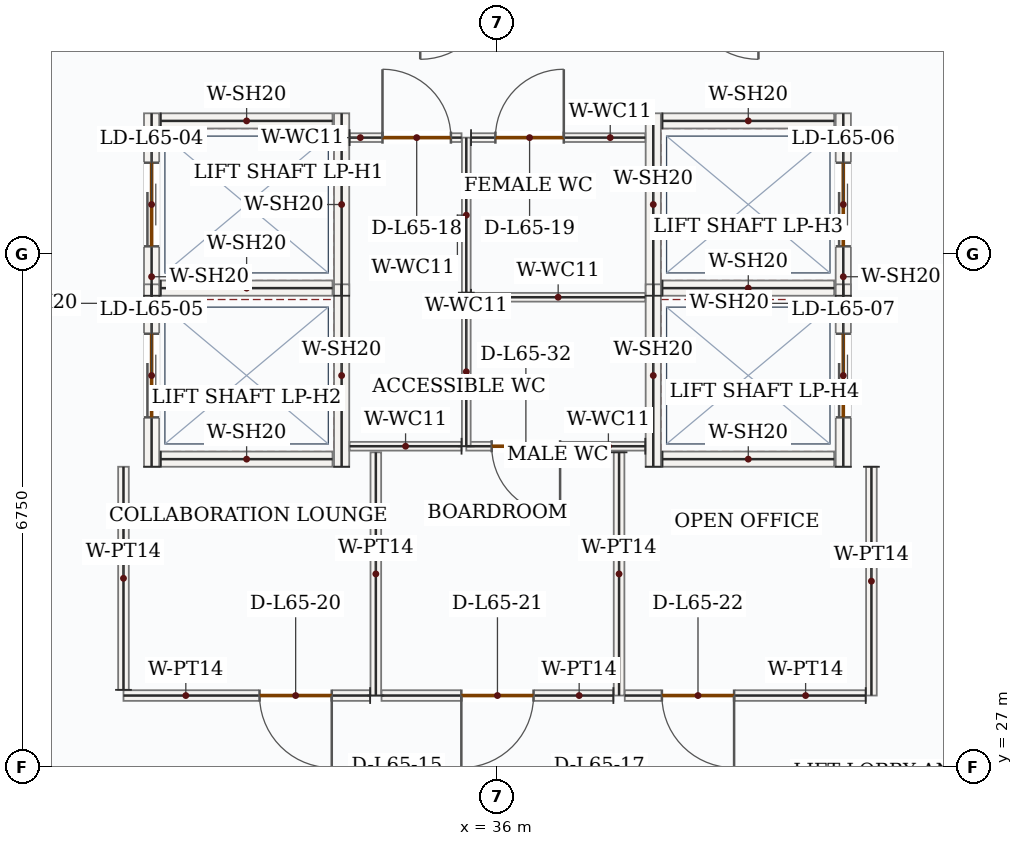
"""IFC4 building model, lengths in metres.
Left out: names, types, materials, properties, quantities, classifications, styles, units other than length and angle.
Written with IfcOpenShell. Run it as: python <this file> out.ifc"""

import sys

from ifc_helpers import new_model, si_unit, direction, frame, frame_2d, origin, place, context, subcontext, project, spatial, rectangle, extrude, source, transform, mapped, element, fill, save


model = new_model("IFC4")
c1 = context("Model", 3, precision=1e-05, world=origin(), true_north=direction((0.0, 1.0)))
c2 = subcontext(c1, "Body", "Model", "MODEL_VIEW")
j1 = project(units=[si_unit("LENGTHUNIT", "METRE"), si_unit("PLANEANGLEUNIT", "RADIAN")], contexts=[c1])
p1 = place(None, origin())
s1 = spatial("IfcSite", under=j1, at=p1, CompositionType="ELEMENT")
p2 = place(p1, origin())
s2 = spatial("IfcBuilding", under=s1, at=p2, CompositionType="ELEMENT")
p3 = place(p2, frame((0.0, 0.0, 272.85)))
s3 = spatial("IfcBuildingStorey", under=s2, at=p3, CompositionType="ELEMENT", Elevation=272.85)
p4 = place(p3, frame((31.45, 33.2, 0.0), z_axis=(0.0, 0.0, 1.0), x_axis=(0.0, 1.0, 0.0)))
e1 = element("IfcWall", 1, at=p4, inside=s3, PredefinedType="SOLIDWALL", context=c2, shape_type="SweptSolid", body=[
    extrude(rectangle(XDim=2.4, YDim=0.2, at=frame_2d((1.2, 0.0))), origin(), (0.0, 0.0, 1.0), 3.5),
])
p5 = place(p4, frame((0.65, 0.0, 0.0)))
e2 = element("IfcOpeningElement", 2, at=p5, cuts=e1, PredefinedType="OPENING", context=c2, shape_type="SweptSolid", body=[
    extrude(rectangle(XDim=1.1, YDim=2.15, at=frame_2d((0.55, 1.075))), frame((0.0, 0.11, 0.0), z_axis=(0.0, -1.0, 0.0), x_axis=(1.0, 0.0, 0.0)), (0.0, 0.0, 1.0), 0.22),
])
m1 = source(origin(), c2, "Body", "SweptSolid", [
    extrude(rectangle(XDim=2.4, YDim=0.2, at=frame_2d((1.2, 0.0))), origin(), (0.0, 0.0, 1.0), 3.5),
])
p6 = place(p3, frame((33.95, 33.2, 0.0), z_axis=(0.0, 0.0, 1.0), x_axis=(0.0, 1.0, 0.0)))
e3 = element("IfcWall", 3, at=p6, inside=s3, PredefinedType="SOLIDWALL", context=c2, shape_type="MappedRepresentation", body=[
    mapped(m1, transform((0.0, 0.0, 0.0), x_axis=(1.0, 0.0, 0.0), y_axis=(0.0, 1.0, 0.0), z_axis=(0.0, 0.0, 1.0), scale=1.0)),
])
m2 = source(origin(), c2, "Body", "SweptSolid", [
    extrude(rectangle(XDim=2.26, YDim=0.2, at=frame_2d((1.13, 0.0))), origin(), (0.0, 0.0, 1.0), 3.5),
])
for number, where, z_axis, x_axis in (
    (4, (31.57, 33.3, 0.0), (0.0, 0.0, 1.0), (1.0, 0.0, 0.0)),
    (5, (31.57, 35.5, 0.0), (0.0, 0.0, 1.0), (1.0, 0.0, 0.0)),
):
    element("IfcWall", number, at=place(p3, frame(where, z_axis=z_axis, x_axis=x_axis)), inside=s3, PredefinedType="SOLIDWALL", context=c2, shape_type="MappedRepresentation", body=[
        mapped(m2, transform((0.0, 0.0, 0.0), x_axis=(1.0, 0.0, 0.0), y_axis=(0.0, 1.0, 0.0), z_axis=(0.0, 0.0, 1.0), scale=1.0)),
    ])
p7 = place(p3, frame((31.45, 30.95, 0.0), z_axis=(0.0, 0.0, 1.0), x_axis=(0.0, 1.0, 0.0)))
e6 = element("IfcWall", 6, at=p7, inside=s3, PredefinedType="SOLIDWALL", context=c2, shape_type="SweptSolid", body=[
    extrude(rectangle(XDim=2.4, YDim=0.2, at=frame_2d((1.2, 0.0))), origin(), (0.0, 0.0, 1.0), 3.5),
])
p8 = place(p7, frame((0.65, 0.0, 0.0)))
e7 = element("IfcOpeningElement", 7, at=p8, cuts=e6, PredefinedType="OPENING", context=c2, shape_type="SweptSolid", body=[
    extrude(rectangle(XDim=1.1, YDim=2.15, at=frame_2d((0.55, 1.075))), frame((0.0, 0.11, 0.0), z_axis=(0.0, -1.0, 0.0), x_axis=(1.0, 0.0, 0.0)), (0.0, 0.0, 1.0), 0.22),
])
p9 = place(p3, frame((33.95, 30.95, 0.0), z_axis=(0.0, 0.0, 1.0), x_axis=(0.0, 1.0, 0.0)))
e8 = element("IfcWall", 8, at=p9, inside=s3, PredefinedType="SOLIDWALL", context=c2, shape_type="MappedRepresentation", body=[
    mapped(m1, transform((0.0, 0.0, 0.0), x_axis=(1.0, 0.0, 0.0), y_axis=(0.0, 1.0, 0.0), z_axis=(0.0, 0.0, 1.0), scale=1.0)),
])
p10 = place(p3, frame((31.57, 31.05, 0.0), z_axis=(0.0, 0.0, 1.0), x_axis=(1.0, 0.0, 0.0)))
e9 = element("IfcWall", 9, at=p10, inside=s3, PredefinedType="SOLIDWALL", context=c2, shape_type="MappedRepresentation", body=[
    mapped(m2, transform((0.0, 0.0, 0.0), x_axis=(1.0, 0.0, 0.0), y_axis=(0.0, 1.0, 0.0), z_axis=(0.0, 0.0, 1.0), scale=1.0)),
])
p11 = place(p3, frame((38.05, 33.2, 0.0), z_axis=(0.0, 0.0, 1.0), x_axis=(0.0, 1.0, 0.0)))
e10 = element("IfcWall", 10, at=p11, inside=s3, PredefinedType="SOLIDWALL", context=c2, shape_type="MappedRepresentation", body=[
    mapped(m1, transform((0.0, 0.0, 0.0), x_axis=(1.0, 0.0, 0.0), y_axis=(0.0, 1.0, 0.0), z_axis=(0.0, 0.0, 1.0), scale=1.0)),
])
p12 = place(p3, frame((40.55, 33.2, 0.0), z_axis=(0.0, 0.0, 1.0), x_axis=(0.0, 1.0, 0.0)))
e11 = element("IfcWall", 11, at=p12, inside=s3, PredefinedType="SOLIDWALL", context=c2, shape_type="SweptSolid", body=[
    extrude(rectangle(XDim=2.4, YDim=0.2, at=frame_2d((1.2, 0.0))), origin(), (0.0, 0.0, 1.0), 3.5),
])
p13 = place(p12, frame((0.65, 0.0, 0.0)))
e12 = element("IfcOpeningElement", 12, at=p13, cuts=e11, PredefinedType="OPENING", context=c2, shape_type="SweptSolid", body=[
    extrude(rectangle(XDim=1.1, YDim=2.15, at=frame_2d((0.55, 1.075))), frame((0.0, 0.11, 0.0), z_axis=(0.0, -1.0, 0.0), x_axis=(1.0, 0.0, 0.0)), (0.0, 0.0, 1.0), 0.22),
])
for number, where, z_axis, x_axis in (
    (13, (38.17, 33.3, 0.0), (0.0, 0.0, 1.0), (1.0, 0.0, 0.0)),
    (14, (38.17, 35.5, 0.0), (0.0, 0.0, 1.0), (1.0, 0.0, 0.0)),
):
    element("IfcWall", number, at=place(p3, frame(where, z_axis=z_axis, x_axis=x_axis)), inside=s3, PredefinedType="SOLIDWALL", context=c2, shape_type="MappedRepresentation", body=[
        mapped(m2, transform((0.0, 0.0, 0.0), x_axis=(1.0, 0.0, 0.0), y_axis=(0.0, 1.0, 0.0), z_axis=(0.0, 0.0, 1.0), scale=1.0)),
    ])
p14 = place(p3, frame((38.05, 30.95, 0.0), z_axis=(0.0, 0.0, 1.0), x_axis=(0.0, 1.0, 0.0)))
e15 = element("IfcWall", 15, at=p14, inside=s3, PredefinedType="SOLIDWALL", context=c2, shape_type="MappedRepresentation", body=[
    mapped(m1, transform((0.0, 0.0, 0.0), x_axis=(1.0, 0.0, 0.0), y_axis=(0.0, 1.0, 0.0), z_axis=(0.0, 0.0, 1.0), scale=1.0)),
])
p15 = place(p3, frame((40.55, 30.95, 0.0), z_axis=(0.0, 0.0, 1.0), x_axis=(0.0, 1.0, 0.0)))
e16 = element("IfcWall", 16, at=p15, inside=s3, PredefinedType="SOLIDWALL", context=c2, shape_type="SweptSolid", body=[
    extrude(rectangle(XDim=2.4, YDim=0.2, at=frame_2d((1.2, 0.0))), origin(), (0.0, 0.0, 1.0), 3.5),
])
p16 = place(p15, frame((0.65, 0.0, 0.0)))
e17 = element("IfcOpeningElement", 17, at=p16, cuts=e16, PredefinedType="OPENING", context=c2, shape_type="SweptSolid", body=[
    extrude(rectangle(XDim=1.1, YDim=2.15, at=frame_2d((0.55, 1.075))), frame((0.0, 0.11, 0.0), z_axis=(0.0, -1.0, 0.0), x_axis=(1.0, 0.0, 0.0)), (0.0, 0.0, 1.0), 0.22),
])
p17 = place(p3, frame((38.17, 31.05, 0.0), z_axis=(0.0, 0.0, 1.0), x_axis=(1.0, 0.0, 0.0)))
e18 = element("IfcWall", 18, at=p17, inside=s3, PredefinedType="SOLIDWALL", context=c2, shape_type="MappedRepresentation", body=[
    mapped(m2, transform((0.0, 0.0, 0.0), x_axis=(1.0, 0.0, 0.0), y_axis=(0.0, 1.0, 0.0), z_axis=(0.0, 0.0, 1.0), scale=1.0)),
])
p18 = place(p3, frame((37.945, 31.22, 0.0), z_axis=(0.0, 0.0, 1.0), x_axis=(-1.0, 0.0, 0.0)))
e19 = element("IfcWall", 19, at=p18, inside=s3, PredefinedType="PARTITIONING", context=c2, shape_type="SweptSolid", body=[
    extrude(rectangle(XDim=2.355, YDim=0.115, at=frame_2d((1.177, 0.0))), origin(), (0.0, 0.0, 1.0), 3.5),
])
p19 = place(p18, frame((1.121, 0.0, 0.0)))
e20 = element("IfcOpeningElement", 20, at=p19, cuts=e19, PredefinedType="OPENING", context=c2, shape_type="SweptSolid", body=[
    extrude(rectangle(XDim=0.9, YDim=2.1, at=frame_2d((0.45, 1.05))), frame((0.0, 0.067, 0.0), z_axis=(0.0, -1.0, 0.0), x_axis=(1.0, 0.0, 0.0)), (0.0, 0.0, 1.0), 0.135),
])
m3 = source(origin(), c2, "Body", "SweptSolid", [
    extrude(rectangle(XDim=1.96, YDim=0.115, at=frame_2d((0.98, 0.0))), origin(), (0.0, 0.0, 1.0), 3.5),
])
p20 = place(p3, frame((35.59, 31.22, 0.0), z_axis=(0.0, 0.0, 1.0), x_axis=(0.0, 1.0, 0.0)))
e21 = element("IfcWall", 21, at=p20, inside=s3, PredefinedType="PARTITIONING", context=c2, shape_type="MappedRepresentation", body=[
    mapped(m3, transform((0.0, 0.0, 0.0), x_axis=(1.0, 0.0, 0.0), y_axis=(0.0, 1.0, 0.0), z_axis=(0.0, 0.0, 1.0), scale=1.0)),
])
m4 = source(origin(), c2, "Body", "SweptSolid", [
    extrude(rectangle(XDim=2.292, YDim=0.115, at=frame_2d((1.146, 0.0))), origin(), (0.0, 0.0, 1.0), 3.5),
])
p21 = place(p3, frame((35.653, 33.18, 0.0), z_axis=(0.0, 0.0, 1.0), x_axis=(1.0, 0.0, 0.0)))
e22 = element("IfcWall", 22, at=p21, inside=s3, PredefinedType="PARTITIONING", context=c2, shape_type="MappedRepresentation", body=[
    mapped(m4, transform((0.0, 0.0, 0.0), x_axis=(1.0, 0.0, 0.0), y_axis=(0.0, 1.0, 0.0), z_axis=(0.0, 0.0, 1.0), scale=1.0)),
])
m5 = source(origin(), c2, "Body", "SweptSolid", [
    extrude(rectangle(XDim=2.04, YDim=0.115, at=frame_2d((1.02, 0.0))), origin(), (0.0, 0.0, 1.0), 3.5),
])
p22 = place(p3, frame((35.59, 33.24, 0.0), z_axis=(0.0, 0.0, 1.0), x_axis=(0.0, 1.0, 0.0)))
e23 = element("IfcWall", 23, at=p22, inside=s3, PredefinedType="PARTITIONING", context=c2, shape_type="MappedRepresentation", body=[
    mapped(m5, transform((0.0, 0.0, 0.0), x_axis=(1.0, 0.0, 0.0), y_axis=(0.0, 1.0, 0.0), z_axis=(0.0, 0.0, 1.0), scale=1.0)),
])
p23 = place(p3, frame((35.653, 35.28, 0.0), z_axis=(0.0, 0.0, 1.0), x_axis=(1.0, 0.0, 0.0)))
e24 = element("IfcWall", 24, at=p23, inside=s3, PredefinedType="PARTITIONING", context=c2, shape_type="SweptSolid", body=[
    extrude(rectangle(XDim=2.292, YDim=0.115, at=frame_2d((1.146, 0.0))), origin(), (0.0, 0.0, 1.0), 3.5),
])
p24 = place(p23, frame((0.32, 0.0, 0.0)))
e25 = element("IfcOpeningElement", 25, at=p24, cuts=e24, PredefinedType="OPENING", context=c2, shape_type="SweptSolid", body=[
    extrude(rectangle(XDim=0.9, YDim=2.1, at=frame_2d((0.45, 1.05))), frame((0.0, 0.067, 0.0), z_axis=(0.0, -1.0, 0.0), x_axis=(1.0, 0.0, 0.0)), (0.0, 0.0, 1.0), 0.135),
])
m6 = source(origin(), c2, "Body", "SweptSolid", [
    extrude(rectangle(XDim=1.473, YDim=0.115, at=frame_2d((0.736, 0.0))), origin(), (0.0, 0.0, 1.0), 3.5),
])
p25 = place(p3, frame((35.528, 31.22, 0.0), z_axis=(0.0, 0.0, 1.0), x_axis=(-1.0, 0.0, 0.0)))
e26 = element("IfcWall", 26, at=p25, inside=s3, PredefinedType="PARTITIONING", context=c2, shape_type="MappedRepresentation", body=[
    mapped(m6, transform((0.0, 0.0, 0.0), x_axis=(1.0, 0.0, 0.0), y_axis=(0.0, 1.0, 0.0), z_axis=(0.0, 0.0, 1.0), scale=1.0)),
])
p26 = place(p3, frame((34.055, 35.28, 0.0), z_axis=(0.0, 0.0, 1.0), x_axis=(1.0, 0.0, 0.0)))
e27 = element("IfcWall", 27, at=p26, inside=s3, PredefinedType="PARTITIONING", context=c2, shape_type="SweptSolid", body=[
    extrude(rectangle(XDim=1.473, YDim=0.115, at=frame_2d((0.736, 0.0))), origin(), (0.0, 0.0, 1.0), 3.5),
])
p27 = place(p26, frame((0.433, 0.0, 0.0)))
e28 = element("IfcOpeningElement", 28, at=p27, cuts=e27, PredefinedType="OPENING", context=c2, shape_type="SweptSolid", body=[
    extrude(rectangle(XDim=0.9, YDim=2.1, at=frame_2d((0.45, 1.05))), frame((0.0, 0.067, 0.0), z_axis=(0.0, -1.0, 0.0), x_axis=(1.0, 0.0, 0.0)), (0.0, 0.0, 1.0), 0.135),
])
m7 = source(origin(), c2, "Body", "SweptSolid", [
    extrude(rectangle(XDim=3.2, YDim=0.14, at=frame_2d((1.6, 0.0))), origin(), (0.0, 0.0, 1.0), 3.5),
])
for number, where, z_axis, x_axis in (
    (29, (34.4, 27.94, 0.0), (0.0, 0.0, 1.0), (0.0, 1.0, 0.0)),
    (30, (37.6, 31.14, 0.0), (0.0, 0.0, 1.0), (0.0, -1.0, 0.0)),
):
    element("IfcWall", number, at=place(p3, frame(where, z_axis=z_axis, x_axis=x_axis)), inside=s3, PredefinedType="PARTITIONING", context=c2, shape_type="MappedRepresentation", body=[
        mapped(m7, transform((0.0, 0.0, 0.0), x_axis=(1.0, 0.0, 0.0), y_axis=(0.0, 1.0, 0.0), z_axis=(0.0, 0.0, 1.0), scale=1.0)),
    ])
p28 = place(p3, frame((37.525, 27.94, 0.0), z_axis=(0.0, 0.0, 1.0), x_axis=(-1.0, 0.0, 0.0)))
e31 = element("IfcWall", 31, at=p28, inside=s3, PredefinedType="PARTITIONING", context=c2, shape_type="SweptSolid", body=[
    extrude(rectangle(XDim=3.05, YDim=0.14, at=frame_2d((1.525, 0.0))), origin(), (0.0, 0.0, 1.0), 3.5),
])
p29 = place(p28, frame((1.05, 0.0, 0.0)))
e32 = element("IfcOpeningElement", 32, at=p29, cuts=e31, PredefinedType="OPENING", context=c2, shape_type="SweptSolid", body=[
    extrude(rectangle(XDim=0.95, YDim=2.15, at=frame_2d((0.475, 1.075))), frame((0.0, 0.08, 0.0), z_axis=(0.0, -1.0, 0.0), x_axis=(1.0, 0.0, 0.0)), (0.0, 0.0, 1.0), 0.16),
])
p30 = place(p3, frame((34.325, 27.94, 0.0), z_axis=(0.0, 0.0, 1.0), x_axis=(-1.0, 0.0, 0.0)))
e33 = element("IfcWall", 33, at=p30, inside=s3, PredefinedType="PARTITIONING", context=c2, shape_type="SweptSolid", body=[
    extrude(rectangle(XDim=3.245, YDim=0.14, at=frame_2d((1.623, 0.0))), origin(), (0.0, 0.0, 1.0), 3.5),
])
p31 = place(p30, frame((0.505, 0.0, 0.0)))
e34 = element("IfcOpeningElement", 34, at=p31, cuts=e33, PredefinedType="OPENING", context=c2, shape_type="SweptSolid", body=[
    extrude(rectangle(XDim=0.95, YDim=2.15, at=frame_2d((0.475, 1.075))), frame((0.0, 0.08, 0.0), z_axis=(0.0, -1.0, 0.0), x_axis=(1.0, 0.0, 0.0)), (0.0, 0.0, 1.0), 0.16),
])
m8 = source(origin(), c2, "Body", "SweptSolid", [
    extrude(rectangle(XDim=2.935, YDim=0.14, at=frame_2d((1.468, 0.0))), origin(), (0.0, 0.0, 1.0), 3.5),
])
p32 = place(p3, frame((31.08, 28.015, 0.0), z_axis=(0.0, 0.0, 1.0), x_axis=(0.0, 1.0, 0.0)))
e35 = element("IfcWall", 35, at=p32, inside=s3, PredefinedType="PARTITIONING", context=c2, shape_type="MappedRepresentation", body=[
    mapped(m8, transform((0.0, 0.0, 0.0), x_axis=(1.0, 0.0, 0.0), y_axis=(0.0, 1.0, 0.0), z_axis=(0.0, 0.0, 1.0), scale=1.0)),
])
m9 = source(origin(), c2, "Body", "SweptSolid", [
    extrude(rectangle(XDim=3.01, YDim=0.14, at=frame_2d((1.505, 0.0))), origin(), (0.0, 0.0, 1.0), 3.5),
])
p33 = place(p3, frame((40.92, 30.95, 0.0), z_axis=(0.0, 0.0, 1.0), x_axis=(0.0, -1.0, 0.0)))
e36 = element("IfcWall", 36, at=p33, inside=s3, PredefinedType="PARTITIONING", context=c2, shape_type="MappedRepresentation", body=[
    mapped(m9, transform((0.0, 0.0, 0.0), x_axis=(1.0, 0.0, 0.0), y_axis=(0.0, 1.0, 0.0), z_axis=(0.0, 0.0, 1.0), scale=1.0)),
])
p34 = place(p3, frame((40.845, 27.94, 0.0), z_axis=(0.0, 0.0, 1.0), x_axis=(-1.0, 0.0, 0.0)))
e37 = element("IfcWall", 37, at=p34, inside=s3, PredefinedType="PARTITIONING", context=c2, shape_type="SweptSolid", body=[
    extrude(rectangle(XDim=3.17, YDim=0.14, at=frame_2d((1.585, 0.0))), origin(), (0.0, 0.0, 1.0), 3.5),
])
p35 = place(p34, frame((1.732, 0.0, 0.0)))
e38 = element("IfcOpeningElement", 38, at=p35, cuts=e37, PredefinedType="OPENING", context=c2, shape_type="SweptSolid", body=[
    extrude(rectangle(XDim=0.95, YDim=2.15, at=frame_2d((0.475, 1.075))), frame((0.0, 0.08, 0.0), z_axis=(0.0, -1.0, 0.0), x_axis=(1.0, 0.0, 0.0)), (0.0, 0.0, 1.0), 0.16),
])
m10 = source(origin(), c2, "Body", "SweptSolid", [
    extrude(rectangle(XDim=1.1, YDim=2.15, at=frame_2d((0.55, 1.075))), frame((0.0, 0.025, 0.0), z_axis=(0.0, -1.0, 0.0), x_axis=(1.0, 0.0, 0.0)), (0.0, 0.0, 1.0), 0.05),
])
p36 = place(p5, origin())
e39 = element("IfcDoor", 39, at=p36, inside=s3, OperationType="DOUBLE_DOOR_SLIDING", PredefinedType="DOOR", context=c2, shape_type="MappedRepresentation", body=[
    mapped(m10, transform((0.0, 0.0, 0.0), x_axis=(1.0, 0.0, 0.0), y_axis=(0.0, 1.0, 0.0), z_axis=(0.0, 0.0, 1.0), scale=1.0)),
])
fill(e2, e39)
p37 = place(p8, origin())
e40 = element("IfcDoor", 40, at=p37, inside=s3, OperationType="DOUBLE_DOOR_SLIDING", PredefinedType="DOOR", context=c2, shape_type="MappedRepresentation", body=[
    mapped(m10, transform((0.0, 0.0, 0.0), x_axis=(1.0, 0.0, 0.0), y_axis=(0.0, 1.0, 0.0), z_axis=(0.0, 0.0, 1.0), scale=1.0)),
])
fill(e7, e40)
p38 = place(p13, origin())
e41 = element("IfcDoor", 41, at=p38, inside=s3, OperationType="DOUBLE_DOOR_SLIDING", PredefinedType="DOOR", context=c2, shape_type="MappedRepresentation", body=[
    mapped(m10, transform((0.0, 0.0, 0.0), x_axis=(1.0, 0.0, 0.0), y_axis=(0.0, 1.0, 0.0), z_axis=(0.0, 0.0, 1.0), scale=1.0)),
])
fill(e12, e41)
p39 = place(p16, origin())
e42 = element("IfcDoor", 42, at=p39, inside=s3, OperationType="DOUBLE_DOOR_SLIDING", PredefinedType="DOOR", context=c2, shape_type="MappedRepresentation", body=[
    mapped(m10, transform((0.0, 0.0, 0.0), x_axis=(1.0, 0.0, 0.0), y_axis=(0.0, 1.0, 0.0), z_axis=(0.0, 0.0, 1.0), scale=1.0)),
])
fill(e17, e42)
m11 = source(origin(), c2, "Body", "SweptSolid", [
    extrude(rectangle(XDim=0.9, YDim=2.1, at=frame_2d((0.45, 1.05))), frame((0.0, 0.025, 0.0), z_axis=(0.0, -1.0, 0.0), x_axis=(1.0, 0.0, 0.0)), (0.0, 0.0, 1.0), 0.05),
])
p40 = place(p27, origin())
e43 = element("IfcDoor", 43, at=p40, inside=s3, OperationType="SINGLE_SWING_LEFT", PredefinedType="DOOR", context=c2, shape_type="MappedRepresentation", body=[
    mapped(m11, transform((0.0, 0.0, 0.0), x_axis=(1.0, 0.0, 0.0), y_axis=(0.0, 1.0, 0.0), z_axis=(0.0, 0.0, 1.0), scale=1.0)),
])
fill(e28, e43)
p41 = place(p24, origin())
e44 = element("IfcDoor", 44, at=p41, inside=s3, OperationType="SINGLE_SWING_RIGHT", PredefinedType="DOOR", context=c2, shape_type="MappedRepresentation", body=[
    mapped(m11, transform((0.0, 0.0, 0.0), x_axis=(1.0, 0.0, 0.0), y_axis=(0.0, 1.0, 0.0), z_axis=(0.0, 0.0, 1.0), scale=1.0)),
])
fill(e25, e44)
m12 = source(origin(), c2, "Body", "SweptSolid", [
    extrude(rectangle(XDim=0.95, YDim=2.15, at=frame_2d((0.475, 1.075))), frame((0.0, 0.025, 0.0), z_axis=(0.0, -1.0, 0.0), x_axis=(1.0, 0.0, 0.0)), (0.0, 0.0, 1.0), 0.05),
])
p42 = place(p31, origin())
e45 = element("IfcDoor", 45, at=p42, inside=s3, OperationType="SINGLE_SWING_LEFT", PredefinedType="DOOR", context=c2, shape_type="MappedRepresentation", body=[
    mapped(m12, transform((0.0, 0.0, 0.0), x_axis=(1.0, 0.0, 0.0), y_axis=(0.0, 1.0, 0.0), z_axis=(0.0, 0.0, 1.0), scale=1.0)),
])
fill(e34, e45)
p43 = place(p29, origin())
e46 = element("IfcDoor", 46, at=p43, inside=s3, OperationType="SINGLE_SWING_RIGHT", PredefinedType="DOOR", context=c2, shape_type="MappedRepresentation", body=[
    mapped(m12, transform((0.0, 0.0, 0.0), x_axis=(1.0, 0.0, 0.0), y_axis=(0.0, 1.0, 0.0), z_axis=(0.0, 0.0, 1.0), scale=1.0)),
])
fill(e32, e46)
p44 = place(p35, origin())
e47 = element("IfcDoor", 47, at=p44, inside=s3, OperationType="SINGLE_SWING_LEFT", PredefinedType="DOOR", context=c2, shape_type="MappedRepresentation", body=[
    mapped(m12, transform((0.0, 0.0, 0.0), x_axis=(1.0, 0.0, 0.0), y_axis=(0.0, 1.0, 0.0), z_axis=(0.0, 0.0, 1.0), scale=1.0)),
])
fill(e38, e47)
p45 = place(p19, origin())
e48 = element("IfcDoor", 48, at=p45, inside=s3, OperationType="SINGLE_SWING_LEFT", PredefinedType="DOOR", context=c2, shape_type="MappedRepresentation", body=[
    mapped(m11, transform((0.0, 0.0, 0.0), x_axis=(1.0, 0.0, 0.0), y_axis=(0.0, 1.0, 0.0), z_axis=(0.0, 0.0, 1.0), scale=1.0)),
])
fill(e20, e48)
save(model, sys.argv[1])
